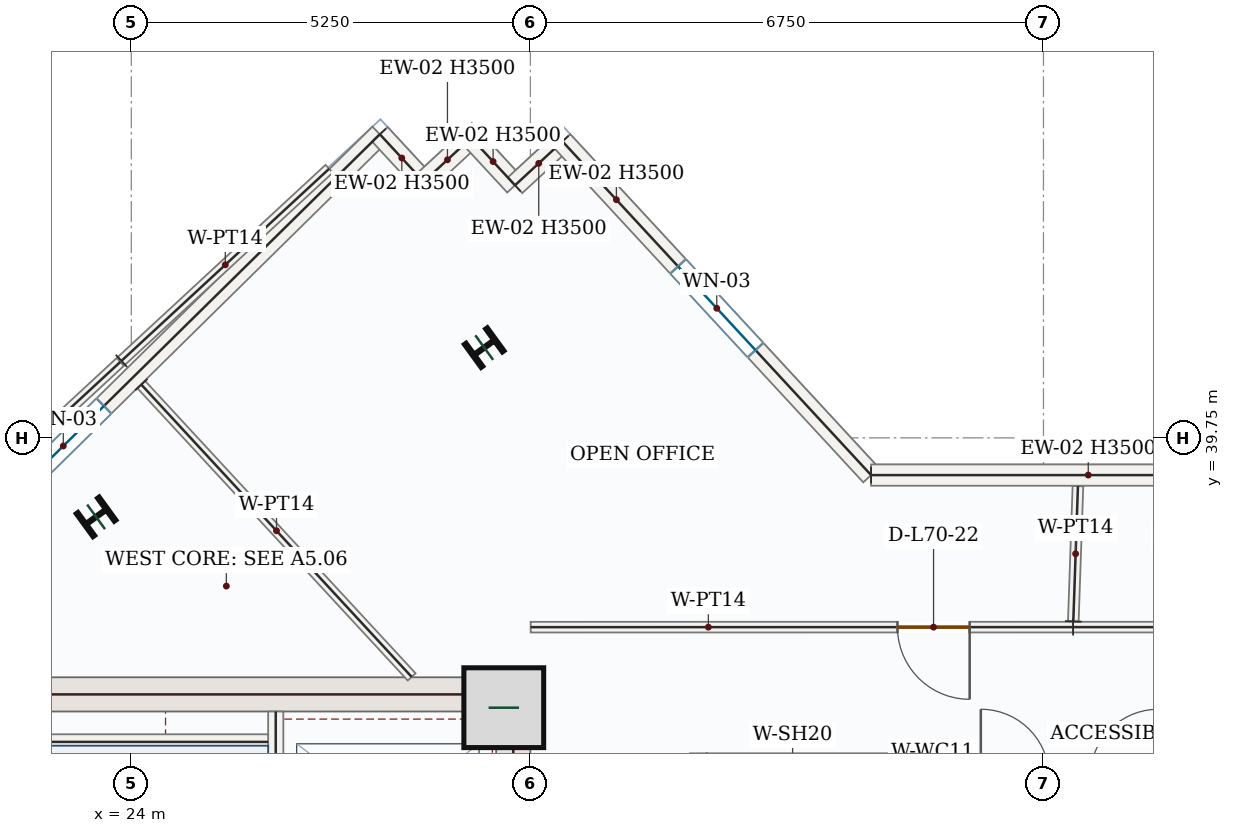
"""IFC4 building model, lengths in metres.
Left out: names, types, materials, properties, quantities, classifications, styles, units other than length and angle.
Written with IfcOpenShell. Run it as: python <this file> out.ifc"""

import sys

from ifc_helpers import new_model, si_unit, direction, frame, frame_2d, origin, origin_2d, place, context, subcontext, project, spatial, rectangle, i_section, extrude, source, transform, mapped, element, fill, save


model = new_model("IFC4")
c1 = context("Model", 3, precision=1e-05, world=origin(), true_north=direction((0.0, 1.0)))
c2 = subcontext(c1, "Body", "Model", "MODEL_VIEW")
j1 = project(units=[si_unit("LENGTHUNIT", "METRE"), si_unit("PLANEANGLEUNIT", "RADIAN")], contexts=[c1])
p1 = place(None, origin())
s1 = spatial("IfcSite", under=j1, at=p1, CompositionType="ELEMENT")
p2 = place(p1, origin())
s2 = spatial("IfcBuilding", under=s1, at=p2, CompositionType="ELEMENT")
p3 = place(p2, frame((0.0, 0.0, 291.6)))
s3 = spatial("IfcBuildingStorey", under=s2, at=p3, CompositionType="ELEMENT", Elevation=291.6)
p4 = place(p3, frame((29.025, 28.05, 0.0), z_axis=(0.0, 0.0, 1.0), x_axis=(0.0, 1.0, 0.0)))
e1 = element("IfcWall", 1, at=p4, inside=s3, PredefinedType="SHEAR", context=c2, shape_type="SweptSolid", body=[
    extrude(rectangle(XDim=8.55, YDim=0.45, at=frame_2d((4.275, 0.0))), origin(), (0.0, 0.0, 1.0), 3.5),
])
p5 = place(p4, frame((1.5, 0.0, 0.0)))
e2 = element("IfcOpeningElement", 2, at=p5, cuts=e1, PredefinedType="OPENING", context=c2, shape_type="SweptSolid", body=[
    extrude(rectangle(XDim=1.1, YDim=2.2, at=frame_2d((0.55, 1.1))), frame((0.0, 0.235, 0.0), z_axis=(0.0, -1.0, 0.0), x_axis=(1.0, 0.0, 0.0)), (0.0, 0.0, 1.0), 0.47),
])
m1 = source(origin(), c2, "Body", "SweptSolid", [
    extrude(rectangle(XDim=7.1, YDim=0.45, at=frame_2d((3.55, 0.0))), origin(), (0.0, 0.0, 1.0), 3.5),
])
p6 = place(p3, frame((21.7, 36.375, 0.0), z_axis=(0.0, 0.0, 1.0), x_axis=(1.0, 0.0, 0.0)))
e3 = element("IfcWall", 3, at=p6, inside=s3, PredefinedType="SHEAR", context=c2, shape_type="MappedRepresentation", body=[
    mapped(m1, transform((0.0, 0.0, 0.0), x_axis=(1.0, 0.0, 0.0), y_axis=(0.0, 1.0, 0.0), z_axis=(0.0, 0.0, 1.0), scale=1.0)),
])
m2 = source(origin(), c2, "Body", "SweptSolid", [
    extrude(rectangle(XDim=1.05, YDim=1.05, at=origin_2d()), origin(), (0.0, 0.0, 1.0), 3.75),
])
p7 = place(p3, frame((28.9, 36.2, 0.0), z_axis=(0.0, 0.0, 1.0), x_axis=(1.0, 0.0, 0.0)))
e4 = element("IfcColumn", 4, at=p7, inside=s3, PredefinedType="COLUMN", context=c2, shape_type="MappedRepresentation", body=[
    mapped(m2, transform((0.0, 0.0, 0.0), x_axis=(1.0, 0.0, 0.0), y_axis=(0.0, 1.0, 0.0), z_axis=(0.0, 0.0, 1.0), scale=1.0)),
])
m3 = source(origin(), c2, "Body", "SweptSolid", [
    extrude(i_section(OverallWidth=0.374, OverallDepth=0.372, WebThickness=0.016, FlangeThickness=0.026, FilletRadius=0.018, at=origin_2d()), origin(), (0.0, 0.0, 1.0), 3.75),
])
for number, where, z_axis, x_axis in (
    (5, (28.643, 40.937, 0.0), (0.0, 0.0, 1.0), (-0.588, 0.809, 0.0)),
    (6, (23.536, 38.711, 0.0), (0.0, 0.0, 1.0), (-0.588, 0.809, 0.0)),
):
    element("IfcColumn", number, at=place(p3, frame(where, z_axis=z_axis, x_axis=x_axis)), inside=s3, PredefinedType="COLUMN", context=c2, shape_type="MappedRepresentation", body=[
        mapped(m3, transform((0.0, 0.0, 0.0), x_axis=(1.0, 0.0, 0.0), y_axis=(0.0, 1.0, 0.0), z_axis=(0.0, 0.0, 1.0), scale=1.0)),
    ])
p8 = place(p3, frame((18.94, 35.542, 0.0), z_axis=(0.0, 0.0, 1.0), x_axis=(0.712557502542, 0.701613715353, 0.0)))
e7 = element("IfcWall", 7, at=p8, inside=s3, PredefinedType="SOLIDWALL", context=c2, shape_type="SweptSolid", body=[
    extrude(rectangle(XDim=11.69, YDim=0.28, at=frame_2d((5.845, 0.0))), origin(), (0.0, 0.0, 1.0), 3.5),
])
p9 = place(p8, frame((5.095, 0.0, 0.85)))
e8 = element("IfcOpeningElement", 8, at=p9, cuts=e7, PredefinedType="OPENING", context=c2, shape_type="SweptSolid", body=[
    extrude(rectangle(XDim=1.5, YDim=1.5, at=frame_2d((0.75, 0.75))), frame((0.0, 0.15, 0.0), z_axis=(0.0, -1.0, 0.0), x_axis=(1.0, 0.0, 0.0)), (0.0, 0.0, 1.0), 0.3),
])
m4 = source(origin(), c2, "Body", "SweptSolid", [
    extrude(rectangle(XDim=0.85, YDim=0.28, at=frame_2d((0.425, 0.0))), origin(), (0.0, 0.0, 1.0), 3.5),
])
for number, where, z_axis, x_axis in (
    (9, (27.27, 43.744, 0.0), (0.0, 0.0, 1.0), (0.679, -0.734, 0.0)),
    (10, (27.847, 43.12, 0.0), (0.0, 0.0, 1.0), (0.734, 0.679, 0.0)),
    (11, (28.471, 43.697, 0.0), (0.0, 0.0, 1.0), (0.679, -0.734, 0.0)),
):
    element("IfcWall", number, at=place(p3, frame(where, z_axis=z_axis, x_axis=x_axis)), inside=s3, PredefinedType="SOLIDWALL", context=c2, shape_type="MappedRepresentation", body=[
        mapped(m4, transform((0.0, 0.0, 0.0), x_axis=(1.0, 0.0, 0.0), y_axis=(0.0, 1.0, 0.0), z_axis=(0.0, 0.0, 1.0), scale=1.0)),
    ])
m5 = source(origin(), c2, "Body", "SweptSolid", [
    extrude(rectangle(XDim=0.85, YDim=0.28, at=frame_2d((0.425, 0.0))), origin(), (0.0, 0.0, 1.0), 3.5),
])
p10 = place(p3, frame((29.048, 43.073, 0.0), z_axis=(0.0, 0.0, 1.0), x_axis=(0.73428557742, 0.678840696183, 0.0)))
e12 = element("IfcWall", 12, at=p10, inside=s3, PredefinedType="SOLIDWALL", context=c2, shape_type="MappedRepresentation", body=[
    mapped(m5, transform((0.0, 0.0, 0.0), x_axis=(1.0, 0.0, 0.0), y_axis=(0.0, 1.0, 0.0), z_axis=(0.0, 0.0, 1.0), scale=1.0)),
])
p11 = place(p3, frame((29.672, 43.65, 0.0), z_axis=(0.0, 0.0, 1.0), x_axis=(0.679010627727, -0.734128440693, 0.0)))
e13 = element("IfcWall", 13, at=p11, inside=s3, PredefinedType="SOLIDWALL", context=c2, shape_type="SweptSolid", body=[
    extrude(rectangle(XDim=5.98, YDim=0.28, at=frame_2d((2.99, 0.0))), origin(), (0.0, 0.0, 1.0), 3.5),
])
p12 = place(p11, frame((2.24, 0.0, 0.85)))
e14 = element("IfcOpeningElement", 14, at=p12, cuts=e13, PredefinedType="OPENING", context=c2, shape_type="SweptSolid", body=[
    extrude(rectangle(XDim=1.5, YDim=1.5, at=frame_2d((0.75, 0.75))), frame((0.0, 0.15, 0.0), z_axis=(0.0, -1.0, 0.0), x_axis=(1.0, 0.0, 0.0)), (0.0, 0.0, 1.0), 0.3),
])
m6 = source(origin(), c2, "Body", "SweptSolid", [
    extrude(rectangle(XDim=5.714, YDim=0.28, at=frame_2d((2.857, 0.0))), origin(), (0.0, 0.0, 1.0), 3.5),
])
p13 = place(p3, frame((33.732, 39.26, 0.0), z_axis=(0.0, 0.0, 1.0), x_axis=(1.0, 0.0, 0.0)))
e15 = element("IfcWall", 15, at=p13, inside=s3, PredefinedType="SOLIDWALL", context=c2, shape_type="MappedRepresentation", body=[
    mapped(m6, transform((0.0, 0.0, 0.0), x_axis=(1.0, 0.0, 0.0), y_axis=(0.0, 1.0, 0.0), z_axis=(0.0, 0.0, 1.0), scale=1.0)),
])
p14 = place(p3, frame((25.9, 28.15, 0.0), z_axis=(0.0, 0.0, 1.0), x_axis=(0.0, 1.0, 0.0)))
e16 = element("IfcWall", 16, at=p14, inside=s3, PredefinedType="SOLIDWALL", context=c2, shape_type="SweptSolid", body=[
    extrude(rectangle(XDim=8.0, YDim=0.2, at=frame_2d((4.0, 0.0))), origin(), (0.0, 0.0, 1.0), 3.5),
])
p15 = place(p14, frame((0.4, 0.0, 0.0)))
e17 = element("IfcOpeningElement", 17, at=p15, cuts=e16, PredefinedType="OPENING", context=c2, shape_type="SweptSolid", body=[
    extrude(rectangle(XDim=1.05, YDim=2.15, at=frame_2d((0.525, 1.075))), frame((0.0, 0.11, 0.0), z_axis=(0.0, -1.0, 0.0), x_axis=(1.0, 0.0, 0.0)), (0.0, 0.0, 1.0), 0.22),
])
m7 = source(origin(), c2, "Body", "SweptSolid", [
    extrude(rectangle(XDim=3.25, YDim=0.2, at=frame_2d((1.625, 0.0))), origin(), (0.0, 0.0, 1.0), 3.5),
])
p16 = place(p3, frame((22.55, 35.75, 0.0), z_axis=(0.0, 0.0, 1.0), x_axis=(1.0, 0.0, 0.0)))
e18 = element("IfcWall", 18, at=p16, inside=s3, PredefinedType="SOLIDWALL", context=c2, shape_type="MappedRepresentation", body=[
    mapped(m7, transform((0.0, 0.0, 0.0), x_axis=(1.0, 0.0, 0.0), y_axis=(0.0, 1.0, 0.0), z_axis=(0.0, 0.0, 1.0), scale=1.0)),
])
p17 = place(p3, frame((31.45, 33.2, 0.0), z_axis=(0.0, 0.0, 1.0), x_axis=(0.0, 1.0, 0.0)))
e19 = element("IfcWall", 19, at=p17, inside=s3, PredefinedType="SOLIDWALL", context=c2, shape_type="SweptSolid", body=[
    extrude(rectangle(XDim=2.4, YDim=0.2, at=frame_2d((1.2, 0.0))), origin(), (0.0, 0.0, 1.0), 3.5),
])
p18 = place(p17, frame((0.65, 0.0, 0.0)))
e20 = element("IfcOpeningElement", 20, at=p18, cuts=e19, PredefinedType="OPENING", context=c2, shape_type="SweptSolid", body=[
    extrude(rectangle(XDim=1.1, YDim=2.15, at=frame_2d((0.55, 1.075))), frame((0.0, 0.11, 0.0), z_axis=(0.0, -1.0, 0.0), x_axis=(1.0, 0.0, 0.0)), (0.0, 0.0, 1.0), 0.22),
])
m8 = source(origin(), c2, "Body", "SweptSolid", [
    extrude(rectangle(XDim=2.4, YDim=0.2, at=frame_2d((1.2, 0.0))), origin(), (0.0, 0.0, 1.0), 3.5),
])
p19 = place(p3, frame((33.95, 33.2, 0.0), z_axis=(0.0, 0.0, 1.0), x_axis=(0.0, 1.0, 0.0)))
e21 = element("IfcWall", 21, at=p19, inside=s3, PredefinedType="SOLIDWALL", context=c2, shape_type="MappedRepresentation", body=[
    mapped(m8, transform((0.0, 0.0, 0.0), x_axis=(1.0, 0.0, 0.0), y_axis=(0.0, 1.0, 0.0), z_axis=(0.0, 0.0, 1.0), scale=1.0)),
])
m9 = source(origin(), c2, "Body", "SweptSolid", [
    extrude(rectangle(XDim=5.5, YDim=0.14, at=frame_2d((2.75, 0.0))), origin(), (0.0, 0.0, 1.0), 3.5),
])
p20 = place(p3, frame((19.818, 37.015, 0.0), z_axis=(0.0, 0.0, 1.0), x_axis=(0.734137611872, 0.679000711954, 0.0)))
e22 = element("IfcWall", 22, at=p20, inside=s3, PredefinedType="PARTITIONING", context=c2, shape_type="MappedRepresentation", body=[
    mapped(m9, transform((0.0, 0.0, 0.0), x_axis=(1.0, 0.0, 0.0), y_axis=(0.0, 1.0, 0.0), z_axis=(0.0, 0.0, 1.0), scale=1.0)),
])
m10 = source(origin(), c2, "Body", "SweptSolid", [
    extrude(rectangle(XDim=5.238, YDim=0.14, at=frame_2d((2.619, 0.0))), origin(), (0.0, 0.0, 1.0), 3.5),
])
p21 = place(p3, frame((24.132, 40.45, 0.0), z_axis=(0.0, 0.0, 1.0), x_axis=(0.67899802156, -0.734140100197, 0.0)))
e23 = element("IfcWall", 23, at=p21, inside=s3, PredefinedType="PARTITIONING", context=c2, shape_type="MappedRepresentation", body=[
    mapped(m10, transform((0.0, 0.0, 0.0), x_axis=(1.0, 0.0, 0.0), y_axis=(0.0, 1.0, 0.0), z_axis=(0.0, 0.0, 1.0), scale=1.0)),
])
p22 = place(p3, frame((42.742, 37.26, 0.0), z_axis=(0.0, 0.0, 1.0), x_axis=(-0.999999999261, 3.8433452e-05, 0.0)))
e24 = element("IfcWall", 24, at=p22, inside=s3, PredefinedType="PARTITIONING", context=c2, shape_type="SweptSolid", body=[
    extrude(rectangle(XDim=6.352, YDim=0.14, at=frame_2d((3.176, 0.0))), origin(), (0.0, 0.0, 1.0), 3.5),
])
p23 = place(p22, frame((4.214, 0.0, 0.0)))
e25 = element("IfcOpeningElement", 25, at=p23, cuts=e24, PredefinedType="OPENING", context=c2, shape_type="SweptSolid", body=[
    extrude(rectangle(XDim=0.95, YDim=2.15, at=frame_2d((0.475, 1.075))), frame((0.0, 0.08, 0.0), z_axis=(0.0, -1.0, 0.0), x_axis=(1.0, 0.0, 0.0)), (0.0, 0.0, 1.0), 0.16),
])
m11 = source(origin(), c2, "Body", "SweptSolid", [
    extrude(rectangle(XDim=1.781, YDim=0.14, at=frame_2d((0.891, 0.0))), origin(), (0.0, 0.0, 1.0), 3.5),
])
p24 = place(p3, frame((36.393, 37.335, 0.0), z_axis=(0.0, 0.0, 1.0), x_axis=(0.034268709891, 0.999412655274, 0.0)))
e26 = element("IfcWall", 26, at=p24, inside=s3, PredefinedType="PARTITIONING", context=c2, shape_type="MappedRepresentation", body=[
    mapped(m11, transform((0.0, 0.0, 0.0), x_axis=(1.0, 0.0, 0.0), y_axis=(0.0, 1.0, 0.0), z_axis=(0.0, 0.0, 1.0), scale=1.0)),
])
m12 = source(origin(), c2, "Body", "SweptSolid", [
    extrude(rectangle(XDim=3.722, YDim=0.14, at=frame_2d((1.861, 0.0))), origin(), (0.0, 0.0, 1.0), 3.5),
])
p25 = place(p3, frame((23.87, 40.763, 0.0), z_axis=(0.0, 0.0, 1.0), x_axis=(0.734119057589, 0.679020772352, 0.0)))
e27 = element("IfcWall", 27, at=p25, inside=s3, PredefinedType="PARTITIONING", context=c2, shape_type="MappedRepresentation", body=[
    mapped(m12, transform((0.0, 0.0, 0.0), x_axis=(1.0, 0.0, 0.0), y_axis=(0.0, 1.0, 0.0), z_axis=(0.0, 0.0, 1.0), scale=1.0)),
])
p26 = place(p3, frame((36.39, 37.26, 0.0), z_axis=(0.0, 0.0, 1.0), x_axis=(-0.999999997659, -6.8420512e-05, 0.0)))
e28 = element("IfcWall", 28, at=p26, inside=s3, PredefinedType="PARTITIONING", context=c2, shape_type="SweptSolid", body=[
    extrude(rectangle(XDim=7.136, YDim=0.14, at=frame_2d((3.568, 0.0))), origin(), (0.0, 0.0, 1.0), 3.5),
])
p27 = place(p26, frame((1.361, 0.0, 0.0)))
e29 = element("IfcOpeningElement", 29, at=p27, cuts=e28, PredefinedType="OPENING", context=c2, shape_type="SweptSolid", body=[
    extrude(rectangle(XDim=0.95, YDim=2.15, at=frame_2d((0.475, 1.075))), frame((0.0, 0.08, 0.0), z_axis=(0.0, -1.0, 0.0), x_axis=(1.0, 0.0, 0.0)), (0.0, 0.0, 1.0), 0.16),
])
m13 = source(origin(), c2, "Body", "SweptSolid", [
    extrude(rectangle(XDim=1.5, YDim=1.5, at=frame_2d((0.75, 0.75))), frame((0.0, 0.03, 0.0), z_axis=(0.0, -1.0, 0.0), x_axis=(1.0, 0.0, 0.0)), (0.0, 0.0, 1.0), 0.06),
])
p28 = place(p9, origin())
e30 = element("IfcWindow", 30, at=p28, inside=s3, PartitioningType="SINGLE_PANEL", PredefinedType="WINDOW", context=c2, shape_type="MappedRepresentation", body=[
    mapped(m13, transform((0.0, 0.0, 0.0), x_axis=(1.0, 0.0, 0.0), y_axis=(0.0, 1.0, 0.0), z_axis=(0.0, 0.0, 1.0), scale=1.0)),
])
fill(e8, e30)
p29 = place(p12, origin())
e31 = element("IfcWindow", 31, at=p29, inside=s3, PartitioningType="SINGLE_PANEL", PredefinedType="WINDOW", context=c2, shape_type="MappedRepresentation", body=[
    mapped(m13, transform((0.0, 0.0, 0.0), x_axis=(1.0, 0.0, 0.0), y_axis=(0.0, 1.0, 0.0), z_axis=(0.0, 0.0, 1.0), scale=1.0)),
])
fill(e14, e31)
m14 = source(origin(), c2, "Body", "SweptSolid", [
    extrude(rectangle(XDim=0.95, YDim=2.15, at=frame_2d((0.475, 1.075))), frame((0.0, 0.025, 0.0), z_axis=(0.0, -1.0, 0.0), x_axis=(1.0, 0.0, 0.0)), (0.0, 0.0, 1.0), 0.05),
])
p30 = place(p27, origin())
e32 = element("IfcDoor", 32, at=p30, inside=s3, OperationType="SINGLE_SWING_LEFT", PredefinedType="DOOR", context=c2, shape_type="MappedRepresentation", body=[
    mapped(m14, transform((0.0, 0.0, 0.0), x_axis=(1.0, 0.0, 0.0), y_axis=(0.0, 1.0, 0.0), z_axis=(0.0, 0.0, 1.0), scale=1.0)),
])
fill(e29, e32)
save(model, sys.argv[1])
